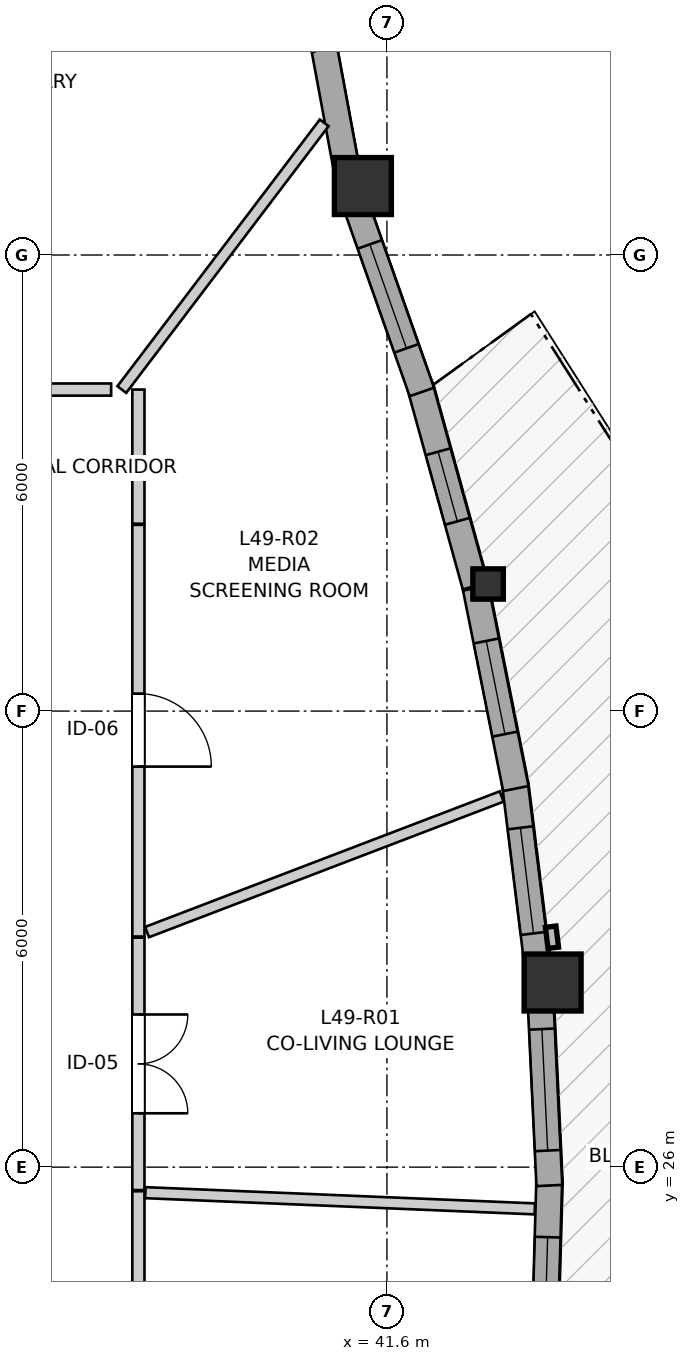
"""IFC4 building model, lengths in metres.
Left out: names, types, materials, properties, quantities, classifications, styles, units other than length and angle.
Written with IfcOpenShell. Run it as: python <this file> out.ifc"""

import sys

from ifc_helpers import new_model, si_unit, direction, frame, frame_2d, origin, origin_2d, place, context, subcontext, project, spatial, rectangle, i_section, extrude, source, transform, mapped, element, fill, save


model = new_model("IFC4")
c1 = context("Model", 3, precision=1e-05, world=origin(), true_north=direction((0.0, 1.0)))
c2 = subcontext(c1, "Body", "Model", "MODEL_VIEW")
j1 = project(units=[si_unit("LENGTHUNIT", "METRE"), si_unit("PLANEANGLEUNIT", "RADIAN")], contexts=[c1])
p1 = place(None, origin())
s1 = spatial("IfcSite", under=j1, at=p1, CompositionType="ELEMENT")
p2 = place(p1, origin())
s2 = spatial("IfcBuilding", under=s1, at=p2, CompositionType="ELEMENT")
p3 = place(p2, frame((0.0, 0.0, 165.0)))
s3 = spatial("IfcBuildingStorey", under=s2, at=p3, CompositionType="ELEMENT", Elevation=165.0)
m1 = source(origin(), c2, "Body", "SweptSolid", [
    extrude(rectangle(XDim=0.75, YDim=0.75, at=origin_2d()), origin(), (0.0, 0.0, 1.0), 2.95),
])
p4 = place(p3, frame((43.78, 28.429, 0.0), z_axis=(0.0, 0.0, 1.0), x_axis=(1.0, 0.0, 0.0)))
e1 = element("IfcColumn", 1, at=p4, inside=s3, PredefinedType="COLUMN", context=c2, shape_type="MappedRepresentation", body=[
    mapped(m1, transform((0.0, 0.0, 0.0), x_axis=(1.0, 0.0, 0.0), y_axis=(0.0, 1.0, 0.0), z_axis=(0.0, 0.0, 1.0), scale=1.0)),
])
m2 = source(origin(), c2, "Body", "SweptSolid", [
    extrude(i_section(OverallWidth=0.401, OverallDepth=0.399, WebThickness=0.023, FlangeThickness=0.036, FilletRadius=0.015, at=origin_2d()), origin(), (0.0, 0.0, 1.0), 2.95),
])
p5 = place(p3, frame((42.931, 33.672, 0.0), z_axis=(0.0, 0.0, 1.0), x_axis=(1.0, 0.0, 0.0)))
e2 = element("IfcColumn", 2, at=p5, inside=s3, PredefinedType="PILASTER", context=c2, shape_type="MappedRepresentation", body=[
    mapped(m2, transform((0.0, 0.0, 0.0), x_axis=(1.0, 0.0, 0.0), y_axis=(0.0, 1.0, 0.0), z_axis=(0.0, 0.0, 1.0), scale=1.0)),
])
p6 = place(p3, frame((41.284, 38.907, 0.0), z_axis=(0.0, 0.0, 1.0), x_axis=(1.0, 0.0, 0.0)))
e3 = element("IfcColumn", 3, at=p6, inside=s3, PredefinedType="COLUMN", context=c2, shape_type="MappedRepresentation", body=[
    mapped(m1, transform((0.0, 0.0, 0.0), x_axis=(1.0, 0.0, 0.0), y_axis=(0.0, 1.0, 0.0), z_axis=(0.0, 0.0, 1.0), scale=1.0)),
])
p7 = place(p3, frame((43.661, 23.203, 0.0), z_axis=(0.0, 0.0, 1.0), x_axis=(0.028240970376, 0.999601144253, 0.0)))
e4 = element("IfcWall", 4, at=p7, inside=s3, PredefinedType="SOLIDWALL", context=c2, shape_type="SweptSolid", body=[
    extrude(rectangle(XDim=2.645, YDim=0.34, at=frame_2d((1.323, 0.0))), origin(), (0.0, 0.0, 1.0), 2.53),
])
p8 = place(p7, frame((0.427, 0.0, 0.82)))
e5 = element("IfcOpeningElement", 5, at=p8, cuts=e4, PredefinedType="OPENING", context=c2, shape_type="SweptSolid", body=[
    extrude(rectangle(XDim=1.45, YDim=1.25, at=frame_2d((0.725, 0.625))), frame((0.0, 0.18, 0.0), z_axis=(0.0, -1.0, 0.0), x_axis=(1.0, 0.0, 0.0)), (0.0, 0.0, 1.0), 0.36),
])
p9 = place(p3, frame((43.737, 25.758, 0.0), z_axis=(0.0, 0.0, 1.0), x_axis=(-0.047648310491, 0.998864174204, 0.0)))
e6 = element("IfcWall", 6, at=p9, inside=s3, PredefinedType="SOLIDWALL", context=c2, shape_type="SweptSolid", body=[
    extrude(rectangle(XDim=2.511, YDim=0.34, at=frame_2d((1.255, 0.0))), origin(), (0.0, 0.0, 1.0), 2.53),
])
p10 = place(p9, frame((0.46, 0.0, 0.82)))
e7 = element("IfcOpeningElement", 7, at=p10, cuts=e6, PredefinedType="OPENING", context=c2, shape_type="SweptSolid", body=[
    extrude(rectangle(XDim=1.6, YDim=1.35, at=frame_2d((0.8, 0.675))), frame((0.0, 0.18, 0.0), z_axis=(0.0, -1.0, 0.0), x_axis=(1.0, 0.0, 0.0)), (0.0, 0.0, 1.0), 0.36),
])
p11 = place(p3, frame((43.592, 28.562, 0.0), z_axis=(0.0, 0.0, 1.0), x_axis=(-0.122868649786, 0.992422941542, 0.0)))
e8 = element("IfcWall", 8, at=p11, inside=s3, PredefinedType="SOLIDWALL", context=c2, shape_type="SweptSolid", body=[
    extrude(rectangle(XDim=2.525, YDim=0.34, at=frame_2d((1.263, 0.0))), origin(), (0.0, 0.0, 1.0), 2.53),
])
p12 = place(p11, frame((0.517, 0.0, 0.82)))
e9 = element("IfcOpeningElement", 9, at=p12, cuts=e8, PredefinedType="OPENING", context=c2, shape_type="SweptSolid", body=[
    extrude(rectangle(XDim=1.4, YDim=1.35, at=frame_2d((0.7, 0.675))), frame((0.0, 0.18, 0.0), z_axis=(0.0, -1.0, 0.0), x_axis=(1.0, 0.0, 0.0)), (0.0, 0.0, 1.0), 0.36),
])
p13 = place(p3, frame((43.296, 30.981, 0.0), z_axis=(0.0, 0.0, 1.0), x_axis=(-0.196185936796, 0.980566712776, 0.0)))
e10 = element("IfcWall", 10, at=p13, inside=s3, PredefinedType="SOLIDWALL", context=c2, shape_type="SweptSolid", body=[
    extrude(rectangle(XDim=2.69, YDim=0.34, at=frame_2d((1.345, 0.0))), origin(), (0.0, 0.0, 1.0), 2.53),
])
p14 = place(p13, frame((0.73, 0.0, 0.82)))
e11 = element("IfcOpeningElement", 11, at=p14, cuts=e10, PredefinedType="OPENING", context=c2, shape_type="SweptSolid", body=[
    extrude(rectangle(XDim=1.25, YDim=1.35, at=frame_2d((0.625, 0.675))), frame((0.0, 0.18, 0.0), z_axis=(0.0, -1.0, 0.0), x_axis=(1.0, 0.0, 0.0)), (0.0, 0.0, 1.0), 0.36),
])
p15 = place(p3, frame((42.762, 33.646, 0.0), z_axis=(0.0, 0.0, 1.0), x_axis=(-0.266469604257, 0.963843322334, 0.0)))
e12 = element("IfcWall", 12, at=p15, inside=s3, PredefinedType="SOLIDWALL", context=c2, shape_type="SweptSolid", body=[
    extrude(rectangle(XDim=2.735, YDim=0.34, at=frame_2d((1.367, 0.0))), origin(), (0.0, 0.0, 1.0), 2.53),
])
p16 = place(p15, frame((0.882, 0.0, 0.82)))
e13 = element("IfcOpeningElement", 13, at=p16, cuts=e12, PredefinedType="OPENING", context=c2, shape_type="SweptSolid", body=[
    extrude(rectangle(XDim=0.95, YDim=1.35, at=frame_2d((0.475, 0.675))), frame((0.0, 0.18, 0.0), z_axis=(0.0, -1.0, 0.0), x_axis=(1.0, 0.0, 0.0)), (0.0, 0.0, 1.0), 0.36),
])
p17 = place(p3, frame((42.059, 36.198, 0.0), z_axis=(0.0, 0.0, 1.0), x_axis=(-0.332714406781, 0.943027636668, 0.0)))
e14 = element("IfcWall", 14, at=p17, inside=s3, PredefinedType="SOLIDWALL", context=c2, shape_type="SweptSolid", body=[
    extrude(rectangle(XDim=2.658, YDim=0.34, at=frame_2d((1.329, 0.0))), origin(), (0.0, 0.0, 1.0), 2.53),
])
p18 = place(p17, frame((0.609, 0.0, 0.82)))
e15 = element("IfcOpeningElement", 15, at=p18, cuts=e14, PredefinedType="OPENING", context=c2, shape_type="SweptSolid", body=[
    extrude(rectangle(XDim=1.45, YDim=1.25, at=frame_2d((0.725, 0.625))), frame((0.0, 0.18, 0.0), z_axis=(0.0, -1.0, 0.0), x_axis=(1.0, 0.0, 0.0)), (0.0, 0.0, 1.0), 0.36),
])
p19 = place(p3, frame((41.088, 39.029, 0.0), z_axis=(0.0, 0.0, 1.0), x_axis=(-0.18244577317, 0.983215917209, 0.0)))
e16 = element("IfcWall", 16, at=p19, inside=s3, PredefinedType="SOLIDWALL", context=c2, shape_type="SweptSolid", body=[
    extrude(rectangle(XDim=1.888, YDim=0.34, at=frame_2d((0.944, 0.0))), origin(), (0.0, 0.0, 1.0), 2.53),
])
p20 = place(p3, frame((38.33, 34.45, 0.0), z_axis=(0.0, 0.0, 1.0), x_axis=(0.0, -1.0, 0.0)))
e17 = element("IfcWall", 17, at=p20, inside=s3, PredefinedType="PARTITIONING", context=c2, shape_type="SweptSolid", body=[
    extrude(rectangle(XDim=5.416, YDim=0.16, at=frame_2d((2.708, 0.0))), origin(), (0.0, 0.0, 1.0), 2.588),
])
p21 = place(p20, frame((2.22, 0.0, 0.0)))
e18 = element("IfcOpeningElement", 18, at=p21, cuts=e17, PredefinedType="OPENING", context=c2, shape_type="SweptSolid", body=[
    extrude(rectangle(XDim=0.96, YDim=2.1, at=frame_2d((0.48, 1.05))), frame((0.0, 0.09, 0.0), z_axis=(0.0, -1.0, 0.0), x_axis=(1.0, 0.0, 0.0)), (0.0, 0.0, 1.0), 0.18),
])
p22 = place(p3, frame((38.33, 25.683, 0.0), z_axis=(0.0, 0.0, 1.0), x_axis=(0.0, -1.0, 0.0)))
e19 = element("IfcWall", 19, at=p22, inside=s3, PredefinedType="PARTITIONING", context=c2, shape_type="SweptSolid", body=[
    extrude(rectangle(XDim=4.483, YDim=0.16, at=frame_2d((2.242, 0.0))), origin(), (0.0, 0.0, 1.0), 2.95),
])
p23 = place(p22, frame((1.769, 0.0, 0.0)))
e20 = element("IfcOpeningElement", 20, at=p23, cuts=e19, PredefinedType="OPENING", context=c2, shape_type="SweptSolid", body=[
    extrude(rectangle(XDim=0.96, YDim=2.1, at=frame_2d((0.48, 1.05))), frame((0.0, 0.09, 0.0), z_axis=(0.0, -1.0, 0.0), x_axis=(1.0, 0.0, 0.0)), (0.0, 0.0, 1.0), 0.18),
])
p24 = place(p3, frame((38.33, 29.019, 0.0), z_axis=(0.0, 0.0, 1.0), x_axis=(0.0, -1.0, 0.0)))
e21 = element("IfcWall", 21, at=p24, inside=s3, PredefinedType="PARTITIONING", context=c2, shape_type="SweptSolid", body=[
    extrude(rectangle(XDim=3.321, YDim=0.16, at=frame_2d((1.661, 0.0))), origin(), (0.0, 0.0, 1.0), 2.95),
])
p25 = place(p24, frame((1.01, 0.0, 0.0)))
e22 = element("IfcOpeningElement", 22, at=p25, cuts=e21, PredefinedType="OPENING", context=c2, shape_type="SweptSolid", body=[
    extrude(rectangle(XDim=1.3, YDim=2.1, at=frame_2d((0.65, 1.05))), frame((0.0, 0.09, 0.0), z_axis=(0.0, -1.0, 0.0), x_axis=(1.0, 0.0, 0.0)), (0.0, 0.0, 1.0), 0.18),
])
p26 = place(p3, frame((38.421, 25.664, 0.0), z_axis=(0.0, 0.0, 1.0), x_axis=(0.999132413059, -0.041646382499, 0.0)))
e23 = element("IfcWall", 23, at=p26, inside=s3, PredefinedType="PARTITIONING", context=c2, shape_type="SweptSolid", body=[
    extrude(rectangle(XDim=5.129, YDim=0.145, at=frame_2d((2.565, 0.0))), origin(), (0.0, 0.0, 1.0), 2.95),
])
p27 = place(p3, frame((38.443, 29.092, 0.0), z_axis=(0.0, 0.0, 1.0), x_axis=(0.934064302859, 0.357104855923, 0.0)))
e24 = element("IfcWall", 24, at=p27, inside=s3, PredefinedType="PARTITIONING", context=c2, shape_type="SweptSolid", body=[
    extrude(rectangle(XDim=4.995, YDim=0.145, at=frame_2d((2.498, 0.0))), origin(), (0.0, 0.0, 1.0), 2.95),
])
p28 = place(p3, frame((38.112, 36.23, 0.0), z_axis=(0.0, 0.0, 1.0), x_axis=(0.604495658019, 0.796608435453, 0.0)))
e25 = element("IfcWall", 25, at=p28, inside=s3, PredefinedType="PARTITIONING", context=c2, shape_type="SweptSolid", body=[
    extrude(rectangle(XDim=4.405, YDim=0.145, at=frame_2d((2.202, 0.0))), origin(), (0.0, 0.0, 1.0), 2.95),
])
p29 = place(p3, frame((38.33, 34.465, 0.0), z_axis=(0.0, 0.0, 1.0), x_axis=(0.0, 1.0, 0.0)))
e26 = element("IfcWall", 26, at=p29, inside=s3, PredefinedType="PARTITIONING", context=c2, shape_type="SweptSolid", body=[
    extrude(rectangle(XDim=1.765, YDim=0.16, at=frame_2d((0.882, 0.0))), origin(), (0.0, 0.0, 1.0), 2.588),
])
p30 = place(p3, frame((36.565, 36.23, 0.0), z_axis=(0.0, 0.0, 1.0), x_axis=(1.0, 0.0, 0.0)))
e27 = element("IfcWall", 27, at=p30, inside=s3, PredefinedType="PARTITIONING", context=c2, shape_type="SweptSolid", body=[
    extrude(rectangle(XDim=1.406, YDim=0.16, at=frame_2d((0.703, 0.0))), origin(), (0.0, 0.0, 1.0), 2.95),
])
m3 = source(origin(), c2, "Body", "SweptSolid", [
    extrude(rectangle(XDim=1.45, YDim=1.25, at=frame_2d((0.725, 0.625))), frame((0.0, 0.03, 0.0), z_axis=(0.0, -1.0, 0.0), x_axis=(1.0, 0.0, 0.0)), (0.0, 0.0, 1.0), 0.06),
])
p31 = place(p8, origin())
e28 = element("IfcWindow", 28, at=p31, inside=s3, PartitioningType="SINGLE_PANEL", PredefinedType="WINDOW", context=c2, shape_type="MappedRepresentation", body=[
    mapped(m3, transform((0.0, 0.0, 0.0), x_axis=(1.0, 0.0, 0.0), y_axis=(0.0, 1.0, 0.0), z_axis=(0.0, 0.0, 1.0), scale=1.0)),
])
fill(e5, e28)
m4 = source(origin(), c2, "Body", "SweptSolid", [
    extrude(rectangle(XDim=1.6, YDim=1.35, at=frame_2d((0.8, 0.675))), frame((0.0, 0.03, 0.0), z_axis=(0.0, -1.0, 0.0), x_axis=(1.0, 0.0, 0.0)), (0.0, 0.0, 1.0), 0.06),
])
p32 = place(p10, origin())
e29 = element("IfcWindow", 29, at=p32, inside=s3, PartitioningType="SINGLE_PANEL", PredefinedType="WINDOW", context=c2, shape_type="MappedRepresentation", body=[
    mapped(m4, transform((0.0, 0.0, 0.0), x_axis=(1.0, 0.0, 0.0), y_axis=(0.0, 1.0, 0.0), z_axis=(0.0, 0.0, 1.0), scale=1.0)),
])
fill(e7, e29)
m5 = source(origin(), c2, "Body", "SweptSolid", [
    extrude(rectangle(XDim=1.4, YDim=1.35, at=frame_2d((0.7, 0.675))), frame((0.0, 0.03, 0.0), z_axis=(0.0, -1.0, 0.0), x_axis=(1.0, 0.0, 0.0)), (0.0, 0.0, 1.0), 0.06),
])
p33 = place(p12, origin())
e30 = element("IfcWindow", 30, at=p33, inside=s3, PartitioningType="SINGLE_PANEL", PredefinedType="WINDOW", context=c2, shape_type="MappedRepresentation", body=[
    mapped(m5, transform((0.0, 0.0, 0.0), x_axis=(1.0, 0.0, 0.0), y_axis=(0.0, 1.0, 0.0), z_axis=(0.0, 0.0, 1.0), scale=1.0)),
])
fill(e9, e30)
m6 = source(origin(), c2, "Body", "SweptSolid", [
    extrude(rectangle(XDim=1.25, YDim=1.35, at=frame_2d((0.625, 0.675))), frame((0.0, 0.03, 0.0), z_axis=(0.0, -1.0, 0.0), x_axis=(1.0, 0.0, 0.0)), (0.0, 0.0, 1.0), 0.06),
])
p34 = place(p14, origin())
e31 = element("IfcWindow", 31, at=p34, inside=s3, PartitioningType="SINGLE_PANEL", PredefinedType="WINDOW", context=c2, shape_type="MappedRepresentation", body=[
    mapped(m6, transform((0.0, 0.0, 0.0), x_axis=(1.0, 0.0, 0.0), y_axis=(0.0, 1.0, 0.0), z_axis=(0.0, 0.0, 1.0), scale=1.0)),
])
fill(e11, e31)
m7 = source(origin(), c2, "Body", "SweptSolid", [
    extrude(rectangle(XDim=0.95, YDim=1.35, at=frame_2d((0.475, 0.675))), frame((0.0, 0.03, 0.0), z_axis=(0.0, -1.0, 0.0), x_axis=(1.0, 0.0, 0.0)), (0.0, 0.0, 1.0), 0.06),
])
p35 = place(p16, origin())
e32 = element("IfcWindow", 32, at=p35, inside=s3, PartitioningType="SINGLE_PANEL", PredefinedType="WINDOW", context=c2, shape_type="MappedRepresentation", body=[
    mapped(m7, transform((0.0, 0.0, 0.0), x_axis=(1.0, 0.0, 0.0), y_axis=(0.0, 1.0, 0.0), z_axis=(0.0, 0.0, 1.0), scale=1.0)),
])
fill(e13, e32)
p36 = place(p18, origin())
e33 = element("IfcWindow", 33, at=p36, inside=s3, PartitioningType="SINGLE_PANEL", PredefinedType="WINDOW", context=c2, shape_type="MappedRepresentation", body=[
    mapped(m3, transform((0.0, 0.0, 0.0), x_axis=(1.0, 0.0, 0.0), y_axis=(0.0, 1.0, 0.0), z_axis=(0.0, 0.0, 1.0), scale=1.0)),
])
fill(e15, e33)
m8 = source(origin(), c2, "Body", "SweptSolid", [
    extrude(rectangle(XDim=0.96, YDim=2.1, at=frame_2d((0.48, 1.05))), frame((0.0, 0.025, 0.0), z_axis=(0.0, -1.0, 0.0), x_axis=(1.0, 0.0, 0.0)), (0.0, 0.0, 1.0), 0.05),
])
p37 = place(p21, origin())
e34 = element("IfcDoor", 34, at=p37, inside=s3, OperationType="SINGLE_SWING_RIGHT", PredefinedType="DOOR", context=c2, shape_type="MappedRepresentation", body=[
    mapped(m8, transform((0.0, 0.0, 0.0), x_axis=(1.0, 0.0, 0.0), y_axis=(0.0, 1.0, 0.0), z_axis=(0.0, 0.0, 1.0), scale=1.0)),
])
fill(e18, e34)
m9 = source(origin(), c2, "Body", "SweptSolid", [
    extrude(rectangle(XDim=1.3, YDim=2.1, at=frame_2d((0.65, 1.05))), frame((0.0, 0.025, 0.0), z_axis=(0.0, -1.0, 0.0), x_axis=(1.0, 0.0, 0.0)), (0.0, 0.0, 1.0), 0.05),
])
p38 = place(p25, origin())
e35 = element("IfcDoor", 35, at=p38, inside=s3, OperationType="DOUBLE_DOOR_SINGLE_SWING", PredefinedType="DOOR", context=c2, shape_type="MappedRepresentation", body=[
    mapped(m9, transform((0.0, 0.0, 0.0), x_axis=(1.0, 0.0, 0.0), y_axis=(0.0, 1.0, 0.0), z_axis=(0.0, 0.0, 1.0), scale=1.0)),
])
fill(e22, e35)
save(model, sys.argv[1])
